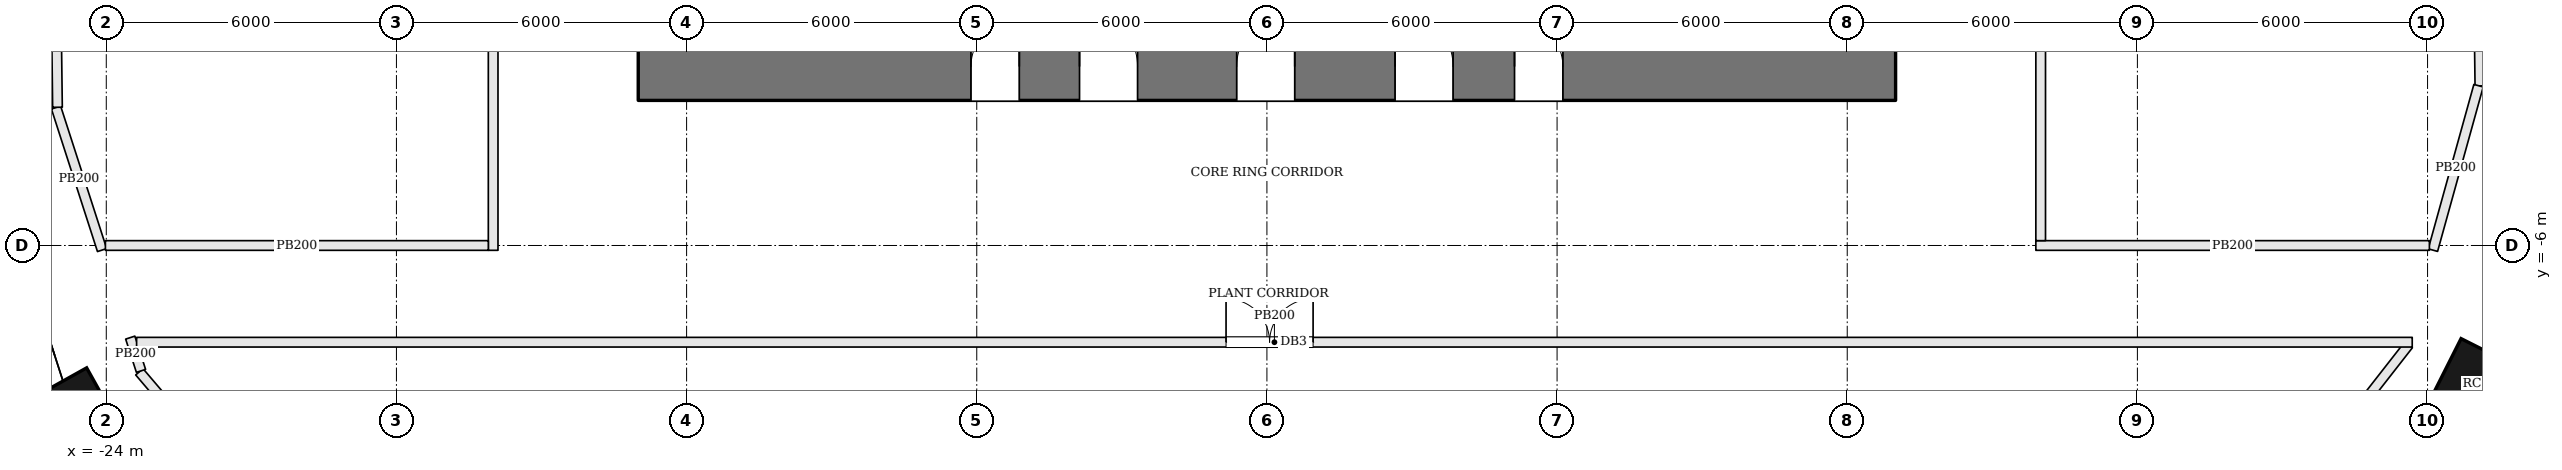
"""IFC4 building model, lengths in metres.
Left out: names, types, materials, properties, quantities, classifications, styles, units other than length and angle.
Written with IfcOpenShell. Run it as: python <this file> out.ifc"""

import sys

from ifc_helpers import new_model, si_unit, direction, frame, frame_2d, origin, origin_2d, place, context, subcontext, project, spatial, rectangle, extrude, element, fill, save


model = new_model("IFC4")
c1 = context("Model", 3, precision=1e-05, world=origin(), true_north=direction((0.0, 1.0)))
c2 = subcontext(c1, "Body", "Model", "MODEL_VIEW")
j1 = project(units=[si_unit("LENGTHUNIT", "METRE"), si_unit("PLANEANGLEUNIT", "RADIAN")], contexts=[c1])
p1 = place(None, origin())
s1 = spatial("IfcSite", under=j1, at=p1, CompositionType="ELEMENT")
p2 = place(p1, origin())
s2 = spatial("IfcBuilding", under=s1, at=p2, CompositionType="ELEMENT")
p3 = place(p2, frame((0.0, 0.0, 33.0)))
s3 = spatial("IfcBuildingStorey", under=s2, at=p3, CompositionType="ELEMENT", Elevation=33.0)
p4 = place(p3, frame((-13.0, -2.3, 0.0), z_axis=(0.0, 0.0, 1.0), x_axis=(1.0, 0.0, 0.0)))
e1 = element("IfcWall", 1, at=p4, inside=s3, PredefinedType="SHEAR", context=c2, shape_type="SweptSolid", body=[
    extrude(rectangle(XDim=26.0, YDim=1.4, at=frame_2d((13.0, 0.0))), origin(), (0.0, 0.0, 1.0), 4.5),
])
p5 = place(p4, frame((9.125, 0.0, 0.0)))
e2 = element("IfcOpeningElement", 2, at=p5, cuts=e1, PredefinedType="OPENING", context=c2, shape_type="SweptSolid", body=[
    extrude(rectangle(XDim=1.2, YDim=2.1, at=frame_2d((0.6, 1.05))), frame((0.0, 0.71, 0.0), z_axis=(0.0, -1.0, 0.0), x_axis=(1.0, 0.0, 0.0)), (0.0, 0.0, 1.0), 1.42),
])
p6 = place(p4, frame((12.375, 0.0, 0.0)))
e3 = element("IfcOpeningElement", 3, at=p6, cuts=e1, PredefinedType="OPENING", context=c2, shape_type="SweptSolid", body=[
    extrude(rectangle(XDim=1.2, YDim=2.1, at=frame_2d((0.6, 1.05))), frame((0.0, 0.71, 0.0), z_axis=(0.0, -1.0, 0.0), x_axis=(1.0, 0.0, 0.0)), (0.0, 0.0, 1.0), 1.42),
])
p7 = place(p4, frame((15.65, 0.0, 0.0)))
e4 = element("IfcOpeningElement", 4, at=p7, cuts=e1, PredefinedType="OPENING", context=c2, shape_type="SweptSolid", body=[
    extrude(rectangle(XDim=1.2, YDim=2.1, at=frame_2d((0.6, 1.05))), frame((0.0, 0.71, 0.0), z_axis=(0.0, -1.0, 0.0), x_axis=(1.0, 0.0, 0.0)), (0.0, 0.0, 1.0), 1.42),
])
p8 = place(p4, frame((6.88, 0.0, 0.0)))
e5 = element("IfcOpeningElement", 5, at=p8, cuts=e1, PredefinedType="OPENING", context=c2, shape_type="SweptSolid", body=[
    extrude(rectangle(XDim=1.0, YDim=2.1, at=frame_2d((0.5, 1.05))), frame((0.0, 0.71, 0.0), z_axis=(0.0, -1.0, 0.0), x_axis=(1.0, 0.0, 0.0)), (0.0, 0.0, 1.0), 1.42),
])
p9 = place(p4, frame((18.12, 0.0, 0.0)))
e6 = element("IfcOpeningElement", 6, at=p9, cuts=e1, PredefinedType="OPENING", context=c2, shape_type="SweptSolid", body=[
    extrude(rectangle(XDim=1.0, YDim=2.1, at=frame_2d((0.5, 1.05))), frame((0.0, 0.71, 0.0), z_axis=(0.0, -1.0, 0.0), x_axis=(1.0, 0.0, 0.0)), (0.0, 0.0, 1.0), 1.42),
])
for number, where, z_axis, x_axis in (
    (7, (-24.676, -9.483, 0.0), (0.0, 0.0, 1.0), (0.487, -0.873, 0.0)),
    (8, (25.003, -8.866, 0.0), (0.0, 0.0, 1.0), (0.45, 0.893, 0.0)),
):
    element("IfcColumn", number, at=place(p3, frame(where, z_axis=z_axis, x_axis=x_axis)), inside=s3, PredefinedType="COLUMN", context=c2, shape_type="SweptSolid", body=[
        extrude(rectangle(XDim=1.4, YDim=1.4, at=origin_2d()), origin(), (0.0, 0.0, 1.0), 4.5),
    ])
p10 = place(p3, frame((23.608, -8.053, 0.0), z_axis=(0.0, 0.0, 1.0), x_axis=(-0.615662559853, -0.78800990628, 0.0)))
e9 = element("IfcWall", 9, at=p10, inside=s3, PredefinedType="PARTITIONING", context=c2, shape_type="SweptSolid", body=[
    extrude(rectangle(XDim=5.884, YDim=0.2, at=frame_2d((2.942, 0.0))), origin(), (0.0, 0.0, 1.0), 4.3),
])
p11 = place(p3, frame((-19.624, -12.945, 0.0), z_axis=(0.0, 0.0, 1.0), x_axis=(-0.648549295441, 0.761172655435, 0.0)))
e10 = element("IfcWall", 10, at=p11, inside=s3, PredefinedType="PARTITIONING", context=c2, shape_type="SweptSolid", body=[
    extrude(rectangle(XDim=5.693, YDim=0.2, at=frame_2d((2.846, 0.0))), origin(), (0.0, 0.0, 1.0), 4.3),
])
p12 = place(p3, frame((-23.282, -8.593, 0.0), z_axis=(0.0, 0.0, 1.0), x_axis=(-0.306992912324, 0.951711800801, 0.0)))
e11 = element("IfcWall", 11, at=p12, inside=s3, PredefinedType="PARTITIONING", context=c2, shape_type="SweptSolid", body=[
    extrude(rectangle(XDim=0.723, YDim=0.2, at=frame_2d((0.361, 0.0))), origin(), (0.0, 0.0, 1.0), 4.3),
])
p13 = place(p3, frame((-23.373, -8.0, 0.0), z_axis=(0.0, 0.0, 1.0), x_axis=(1.0, 0.0, 0.0)))
e12 = element("IfcWall", 12, at=p13, inside=s3, PredefinedType="PARTITIONING", context=c2, shape_type="SweptSolid", body=[
    extrude(rectangle(XDim=47.056, YDim=0.2, at=frame_2d((23.528, 0.0))), origin(), (0.0, 0.0, 1.0), 4.3),
])
p14 = place(p13, frame((22.528, 0.0, 0.0)))
e13 = element("IfcOpeningElement", 13, at=p14, cuts=e12, PredefinedType="OPENING", context=c2, shape_type="SweptSolid", body=[
    extrude(rectangle(XDim=1.8, YDim=2.1, at=frame_2d((0.9, 1.05))), frame((0.0, 0.11, 0.0), z_axis=(0.0, -1.0, 0.0), x_axis=(1.0, 0.0, 0.0)), (0.0, 0.0, 1.0), 0.22),
])
p15 = place(p3, frame((-24.087, -6.095, 0.0), z_axis=(0.0, 0.0, 1.0), x_axis=(-0.307348144774, 0.951597140551, 0.0)))
e14 = element("IfcWall", 14, at=p15, inside=s3, PredefinedType="PARTITIONING", context=c2, shape_type="SweptSolid", body=[
    extrude(rectangle(XDim=3.098, YDim=0.2, at=frame_2d((1.549, 0.0))), origin(), (0.0, 0.0, 1.0), 4.3),
])
p16 = place(p3, frame((-25.009, -3.142, 0.0), z_axis=(0.0, 0.0, 1.0), x_axis=(-0.012494323245, 0.999921942897, 0.0)))
e15 = element("IfcWall", 15, at=p16, inside=s3, PredefinedType="PARTITIONING", context=c2, shape_type="SweptSolid", body=[
    extrude(rectangle(XDim=5.843, YDim=0.2, at=frame_2d((2.921, 0.0))), origin(), (0.0, 0.0, 1.0), 4.3),
])
p17 = place(p3, frame((-16.0, 14.85, 0.0), z_axis=(0.0, 0.0, 1.0), x_axis=(0.0, -1.0, 0.0)))
e16 = element("IfcWall", 16, at=p17, inside=s3, PredefinedType="PARTITIONING", context=c2, shape_type="SweptSolid", body=[
    extrude(rectangle(XDim=20.95, YDim=0.2, at=frame_2d((10.475, 0.0))), origin(), (0.0, 0.0, 1.0), 4.3),
])
p18 = place(p17, frame((9.45, 0.0, 0.0)))
e17 = element("IfcOpeningElement", 17, at=p18, cuts=e16, PredefinedType="OPENING", context=c2, shape_type="SweptSolid", body=[
    extrude(rectangle(XDim=1.8, YDim=2.1, at=frame_2d((0.9, 1.05))), frame((0.0, 0.11, 0.0), z_axis=(0.0, -1.0, 0.0), x_axis=(1.0, 0.0, 0.0)), (0.0, 0.0, 1.0), 0.22),
])
p19 = place(p3, frame((-16.1, -6.0, 0.0), z_axis=(0.0, 0.0, 1.0), x_axis=(-1.0, 0.0, 0.0)))
e18 = element("IfcWall", 18, at=p19, inside=s3, PredefinedType="PARTITIONING", context=c2, shape_type="SweptSolid", body=[
    extrude(rectangle(XDim=7.918, YDim=0.2, at=frame_2d((3.959, 0.0))), origin(), (0.0, 0.0, 1.0), 4.3),
])
p20 = place(p3, frame((25.009, 3.142, 0.0), z_axis=(0.0, 0.0, 1.0), x_axis=(0.012494323245, -0.999921942897, 0.0)))
e19 = element("IfcWall", 19, at=p20, inside=s3, PredefinedType="PARTITIONING", context=c2, shape_type="SweptSolid", body=[
    extrude(rectangle(XDim=5.843, YDim=0.2, at=frame_2d((2.921, 0.0))), origin(), (0.0, 0.0, 1.0), 4.3),
])
p21 = place(p3, frame((25.054, -2.696, 0.0), z_axis=(0.0, 0.0, 1.0), x_axis=(-0.267236988138, -0.963630838117, 0.0)))
e20 = element("IfcWall", 20, at=p21, inside=s3, PredefinedType="PARTITIONING", context=c2, shape_type="SweptSolid", body=[
    extrude(rectangle(XDim=3.528, YDim=0.2, at=frame_2d((1.764, 0.0))), origin(), (0.0, 0.0, 1.0), 4.3),
])
p22 = place(p3, frame((24.038, -6.0, 0.0), z_axis=(0.0, 0.0, 1.0), x_axis=(-1.0, 0.0, 0.0)))
e21 = element("IfcWall", 21, at=p22, inside=s3, PredefinedType="PARTITIONING", context=c2, shape_type="SweptSolid", body=[
    extrude(rectangle(XDim=8.138, YDim=0.2, at=frame_2d((4.069, 0.0))), origin(), (0.0, 0.0, 1.0), 4.3),
])
p23 = place(p3, frame((16.0, -5.9, 0.0), z_axis=(0.0, 0.0, 1.0), x_axis=(0.0, 1.0, 0.0)))
e22 = element("IfcWall", 22, at=p23, inside=s3, PredefinedType="PARTITIONING", context=c2, shape_type="SweptSolid", body=[
    extrude(rectangle(XDim=20.75, YDim=0.2, at=frame_2d((10.375, 0.0))), origin(), (0.0, 0.0, 1.0), 4.3),
])
p24 = place(p23, frame((9.5, 0.0, 0.0)))
e23 = element("IfcOpeningElement", 23, at=p24, cuts=e22, PredefinedType="OPENING", context=c2, shape_type="SweptSolid", body=[
    extrude(rectangle(XDim=1.8, YDim=2.1, at=frame_2d((0.9, 1.05))), frame((0.0, 0.11, 0.0), z_axis=(0.0, -1.0, 0.0), x_axis=(1.0, 0.0, 0.0)), (0.0, 0.0, 1.0), 0.22),
])
p25 = place(p5, origin())
e24 = element("IfcDoor", 24, at=p25, inside=s3, OperationType="SINGLE_SWING_LEFT", PredefinedType="DOOR", context=c2, shape_type="SweptSolid", body=[
    extrude(rectangle(XDim=1.2, YDim=2.1, at=frame_2d((0.6, 1.05))), frame((0.0, 0.025, 0.0), z_axis=(0.0, -1.0, 0.0), x_axis=(1.0, 0.0, 0.0)), (0.0, 0.0, 1.0), 0.05),
])
fill(e2, e24)
p26 = place(p6, origin())
e25 = element("IfcDoor", 25, at=p26, inside=s3, OperationType="SINGLE_SWING_RIGHT", PredefinedType="DOOR", context=c2, shape_type="SweptSolid", body=[
    extrude(rectangle(XDim=1.2, YDim=2.1, at=frame_2d((0.6, 1.05))), frame((0.0, 0.025, 0.0), z_axis=(0.0, -1.0, 0.0), x_axis=(1.0, 0.0, 0.0)), (0.0, 0.0, 1.0), 0.05),
])
fill(e3, e25)
p27 = place(p7, origin())
e26 = element("IfcDoor", 26, at=p27, inside=s3, OperationType="SINGLE_SWING_LEFT", PredefinedType="DOOR", context=c2, shape_type="SweptSolid", body=[
    extrude(rectangle(XDim=1.2, YDim=2.1, at=frame_2d((0.6, 1.05))), frame((0.0, 0.025, 0.0), z_axis=(0.0, -1.0, 0.0), x_axis=(1.0, 0.0, 0.0)), (0.0, 0.0, 1.0), 0.05),
])
fill(e4, e26)
p28 = place(p8, origin())
e27 = element("IfcDoor", 27, at=p28, inside=s3, OperationType="SINGLE_SWING_RIGHT", PredefinedType="DOOR", context=c2, shape_type="SweptSolid", body=[
    extrude(rectangle(XDim=1.0, YDim=2.1, at=frame_2d((0.5, 1.05))), frame((0.0, 0.025, 0.0), z_axis=(0.0, -1.0, 0.0), x_axis=(1.0, 0.0, 0.0)), (0.0, 0.0, 1.0), 0.05),
])
fill(e5, e27)
p29 = place(p9, origin())
e28 = element("IfcDoor", 28, at=p29, inside=s3, OperationType="SINGLE_SWING_LEFT", PredefinedType="DOOR", context=c2, shape_type="SweptSolid", body=[
    extrude(rectangle(XDim=1.0, YDim=2.1, at=frame_2d((0.5, 1.05))), frame((0.0, 0.025, 0.0), z_axis=(0.0, -1.0, 0.0), x_axis=(1.0, 0.0, 0.0)), (0.0, 0.0, 1.0), 0.05),
])
fill(e6, e28)
p30 = place(p14, origin())
e29 = element("IfcDoor", 29, at=p30, inside=s3, OperationType="DOUBLE_DOOR_SINGLE_SWING", PredefinedType="DOOR", context=c2, shape_type="SweptSolid", body=[
    extrude(rectangle(XDim=1.8, YDim=2.1, at=frame_2d((0.9, 1.05))), frame((0.0, 0.025, 0.0), z_axis=(0.0, -1.0, 0.0), x_axis=(1.0, 0.0, 0.0)), (0.0, 0.0, 1.0), 0.05),
])
fill(e13, e29)
save(model, sys.argv[1])
